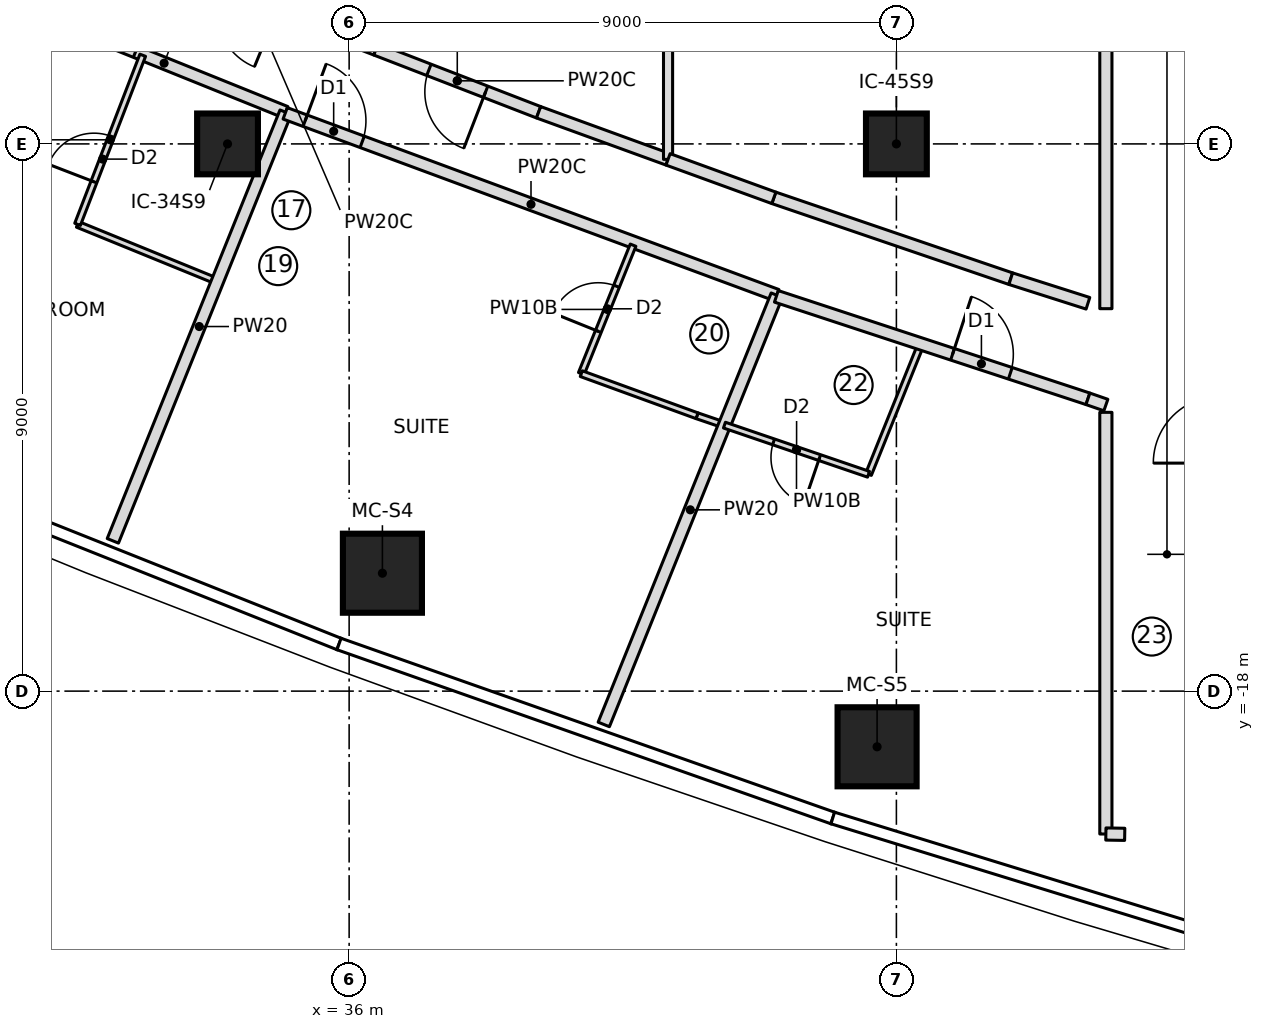
"""IFC4 building model, lengths in metres.
Left out: names, types, materials, properties, quantities, classifications, styles, units other than length and angle.
Written with IfcOpenShell. Run it as: python <this file> out.ifc"""

import sys

from ifc_helpers import new_model, si_unit, direction, frame, frame_2d, origin, origin_2d, place, context, subcontext, project, spatial, rectangle, extrude, element, fill, save


model = new_model("IFC4")
c1 = context("Model", 3, precision=1e-05, world=origin(), true_north=direction((0.0, 1.0)))
c2 = subcontext(c1, "Body", "Model", "MODEL_VIEW")
j1 = project(units=[si_unit("LENGTHUNIT", "METRE"), si_unit("PLANEANGLEUNIT", "RADIAN")], contexts=[c1])
p1 = place(None, origin())
s1 = spatial("IfcSite", under=j1, at=p1, CompositionType="ELEMENT")
p2 = place(p1, origin())
s2 = spatial("IfcBuilding", under=s1, at=p2, CompositionType="ELEMENT")
p3 = place(p2, frame((0.0, 0.0, 203.9)))
s3 = spatial("IfcBuildingStorey", under=s2, at=p3, CompositionType="ELEMENT", Elevation=203.9)
for number, where, z_axis, x_axis in (
    (1, (36.547, -16.061, 0.0), (0.0, 0.0, 1.0), (1.0, 0.0, 0.0)),
    (2, (44.683, -18.916, 0.0), (0.0, 0.0, 1.0), (1.0, 0.0, 0.0)),
):
    element("IfcColumn", number, at=place(p3, frame(where, z_axis=z_axis, x_axis=x_axis)), inside=s3, PredefinedType="COLUMN", context=c2, shape_type="SweptSolid", body=[
        extrude(rectangle(XDim=1.3, YDim=1.3, at=origin_2d()), origin(), (0.0, 0.0, 1.0), 3.55),
    ])
for number, where, z_axis, x_axis in (
    (3, (34.0, -9.0, 0.0), (0.0, 0.0, 1.0), (1.0, 0.0, 0.0)),
    (4, (45.0, -9.0, 0.0), (0.0, 0.0, 1.0), (1.0, 0.0, 0.0)),
):
    element("IfcColumn", number, at=place(p3, frame(where, z_axis=z_axis, x_axis=x_axis)), inside=s3, PredefinedType="COLUMN", context=c2, shape_type="SweptSolid", body=[
        extrude(rectangle(XDim=1.0, YDim=1.0, at=origin_2d()), origin(), (0.0, 0.0, 1.0), 3.55),
    ])
p4 = place(p3, frame((30.958, -6.866, 0.0), z_axis=(0.0, 0.0, 1.0), x_axis=(0.927398695046, -0.374074404933, 0.0)))
e5 = element("IfcWall", 5, at=p4, inside=s3, PredefinedType="PARTITIONING", context=c2, shape_type="SweptSolid", body=[
    extrude(rectangle(XDim=4.311, YDim=0.2, at=frame_2d((2.155, 0.0))), origin(), (0.0, 0.0, 1.0), 3.25),
])
p5 = place(p4, frame((0.65, 0.0, 0.0)))
e6 = element("IfcOpeningElement", 6, at=p5, cuts=e5, PredefinedType="OPENING", context=c2, shape_type="SweptSolid", body=[
    extrude(rectangle(XDim=1.0, YDim=2.1, at=frame_2d((0.5, 1.05))), frame((0.0, 0.11, 0.0), z_axis=(0.0, -1.0, 0.0), x_axis=(1.0, 0.0, 0.0)), (0.0, 0.0, 1.0), 0.22),
])
p6 = place(p3, frame((33.834, -11.261, 0.0), z_axis=(0.0, 0.0, 1.0), x_axis=(-0.925906573805, 0.377752586469, 0.0)))
e7 = element("IfcWall", 7, at=p6, inside=s3, PredefinedType="PARTITIONING", context=c2, shape_type="SweptSolid", body=[
    extrude(rectangle(XDim=2.484, YDim=0.1, at=frame_2d((1.242, 0.0))), origin(), (0.0, 0.0, 1.0), 3.25),
])
p7 = place(p3, frame((31.534, -10.323, 0.0), z_axis=(0.0, 0.0, 1.0), x_axis=(0.359610255373, 0.933102601127, 0.0)))
e8 = element("IfcWall", 8, at=p7, inside=s3, PredefinedType="PARTITIONING", context=c2, shape_type="SweptSolid", body=[
    extrude(rectangle(XDim=2.98, YDim=0.1, at=frame_2d((1.49, 0.0))), origin(), (0.0, 0.0, 1.0), 3.25),
])
p8 = place(p7, frame((0.75, 0.0, 0.0)))
e9 = element("IfcOpeningElement", 9, at=p8, cuts=e8, PredefinedType="OPENING", context=c2, shape_type="SweptSolid", body=[
    extrude(rectangle(XDim=0.8, YDim=2.1, at=frame_2d((0.4, 1.05))), frame((0.0, 0.06, 0.0), z_axis=(0.0, -1.0, 0.0), x_axis=(1.0, 0.0, 0.0)), (0.0, 0.0, 1.0), 0.12),
])
p9 = place(p3, frame((32.114, -15.528, 0.0), z_axis=(0.0, 0.0, 1.0), x_axis=(0.373881438439, 0.927476506436, 0.0)))
e10 = element("IfcWall", 10, at=p9, inside=s3, PredefinedType="PARTITIONING", context=c2, shape_type="SweptSolid", body=[
    extrude(rectangle(XDim=7.601, YDim=0.2, at=frame_2d((3.8, 0.0))), origin(), (0.0, 0.0, 1.0), 3.25),
])
p10 = place(p3, frame((34.948, -8.497, 0.0), z_axis=(0.0, 0.0, 1.0), x_axis=(0.937864515454, -0.347001657996, 0.0)))
e11 = element("IfcWall", 11, at=p10, inside=s3, PredefinedType="PARTITIONING", context=c2, shape_type="SweptSolid", body=[
    extrude(rectangle(XDim=8.621, YDim=0.2, at=frame_2d((4.311, 0.0))), origin(), (0.0, 0.0, 1.0), 3.25),
])
p11 = place(p10, frame((0.35, 0.0, 0.0)))
e12 = element("IfcOpeningElement", 12, at=p11, cuts=e11, PredefinedType="OPENING", context=c2, shape_type="SweptSolid", body=[
    extrude(rectangle(XDim=1.0, YDim=2.1, at=frame_2d((0.5, 1.05))), frame((0.0, 0.11, 0.0), z_axis=(0.0, -1.0, 0.0), x_axis=(1.0, 0.0, 0.0)), (0.0, 0.0, 1.0), 0.22),
])
p12 = place(p3, frame((39.818, -12.779, 0.0), z_axis=(0.0, 0.0, 1.0), x_axis=(0.373883593317, 0.927475637765, 0.0)))
e13 = element("IfcWall", 13, at=p12, inside=s3, PredefinedType="PARTITIONING", context=c2, shape_type="SweptSolid", body=[
    extrude(rectangle(XDim=2.278, YDim=0.1, at=frame_2d((1.139, 0.0))), origin(), (0.0, 0.0, 1.0), 3.25),
])
p13 = place(p12, frame((0.75, 0.0, 0.0)))
e14 = element("IfcOpeningElement", 14, at=p13, cuts=e13, PredefinedType="OPENING", context=c2, shape_type="SweptSolid", body=[
    extrude(rectangle(XDim=0.8, YDim=2.1, at=frame_2d((0.4, 1.05))), frame((0.0, 0.06, 0.0), z_axis=(0.0, -1.0, 0.0), x_axis=(1.0, 0.0, 0.0)), (0.0, 0.0, 1.0), 0.12),
])
p14 = place(p3, frame((42.172, -13.625, 0.0), z_axis=(0.0, 0.0, 1.0), x_axis=(-0.946456821894, 0.322830426526, 0.0)))
e15 = element("IfcWall", 15, at=p14, inside=s3, PredefinedType="PARTITIONING", context=c2, shape_type="SweptSolid", body=[
    extrude(rectangle(XDim=0.476, YDim=0.1, at=frame_2d((0.238, 0.0))), origin(), (0.0, 0.0, 1.0), 3.25),
])
p15 = place(p3, frame((41.721, -13.471, 0.0), z_axis=(0.0, 0.0, 1.0), x_axis=(-0.939737092411, 0.341897933814, 0.0)))
e16 = element("IfcWall", 16, at=p15, inside=s3, PredefinedType="PARTITIONING", context=c2, shape_type="SweptSolid", body=[
    extrude(rectangle(XDim=2.025, YDim=0.1, at=frame_2d((1.013, 0.0))), origin(), (0.0, 0.0, 1.0), 3.25),
])
p16 = place(p3, frame((40.188, -18.548, 0.0), z_axis=(0.0, 0.0, 1.0), x_axis=(0.373877998371, 0.927477893178, 0.0)))
e17 = element("IfcWall", 17, at=p16, inside=s3, PredefinedType="PARTITIONING", context=c2, shape_type="SweptSolid", body=[
    extrude(rectangle(XDim=7.611, YDim=0.2, at=frame_2d((3.806, 0.0))), origin(), (0.0, 0.0, 1.0), 3.25),
])
p17 = place(p3, frame((45.395, -12.318, 0.0), z_axis=(0.0, 0.0, 1.0), x_axis=(-0.373917841166, -0.927461831052, 0.0)))
e18 = element("IfcWall", 18, at=p17, inside=s3, PredefinedType="PARTITIONING", context=c2, shape_type="SweptSolid", body=[
    extrude(rectangle(XDim=2.281, YDim=0.1, at=frame_2d((1.14, 0.0))), origin(), (0.0, 0.0, 1.0), 3.25),
])
p18 = place(p3, frame((44.542, -14.434, 0.0), z_axis=(0.0, 0.0, 1.0), x_axis=(-0.946406575113, 0.322977699822, 0.0)))
e19 = element("IfcWall", 19, at=p18, inside=s3, PredefinedType="PARTITIONING", context=c2, shape_type="SweptSolid", body=[
    extrude(rectangle(XDim=2.504, YDim=0.1, at=frame_2d((1.252, 0.0))), origin(), (0.0, 0.0, 1.0), 3.25),
])
p19 = place(p18, frame((0.85, 0.0, 0.0)))
e20 = element("IfcOpeningElement", 20, at=p19, cuts=e19, PredefinedType="OPENING", context=c2, shape_type="SweptSolid", body=[
    extrude(rectangle(XDim=0.8, YDim=2.1, at=frame_2d((0.4, 1.05))), frame((0.0, 0.06, 0.0), z_axis=(0.0, -1.0, 0.0), x_axis=(1.0, 0.0, 0.0)), (0.0, 0.0, 1.0), 0.12),
])
p20 = place(p3, frame((36.441, -7.445, 0.0), z_axis=(0.0, 0.0, 1.0), x_axis=(-0.932724985261, 0.360588549276, 0.0)))
e21 = element("IfcWall", 21, at=p20, inside=s3, PredefinedType="PARTITIONING", context=c2, shape_type="SweptSolid", body=[
    extrude(rectangle(XDim=1.25, YDim=0.2, at=frame_2d((0.625, 0.0))), origin(), (0.0, 0.0, 1.0), 3.25),
])
p21 = place(p3, frame((39.115, -8.479, 0.0), z_axis=(0.0, 0.0, 1.0), x_axis=(-0.932650373077, 0.36078148733, 0.0)))
e22 = element("IfcWall", 22, at=p21, inside=s3, PredefinedType="PARTITIONING", context=c2, shape_type="SweptSolid", body=[
    extrude(rectangle(XDim=2.867, YDim=0.2, at=frame_2d((1.434, 0.0))), origin(), (0.0, 0.0, 1.0), 3.25),
])
p22 = place(p21, frame((0.934, 0.0, 0.0)))
e23 = element("IfcOpeningElement", 23, at=p22, cuts=e22, PredefinedType="OPENING", context=c2, shape_type="SweptSolid", body=[
    extrude(rectangle(XDim=1.0, YDim=2.1, at=frame_2d((0.5, 1.05))), frame((0.0, 0.11, 0.0), z_axis=(0.0, -1.0, 0.0), x_axis=(1.0, 0.0, 0.0)), (0.0, 0.0, 1.0), 0.22),
])
p23 = place(p3, frame((41.245, -9.254, 0.0), z_axis=(0.0, 0.0, 1.0), x_axis=(-0.939746227223, 0.341872824923, 0.0)))
e24 = element("IfcWall", 24, at=p23, inside=s3, PredefinedType="PARTITIONING", context=c2, shape_type="SweptSolid", body=[
    extrude(rectangle(XDim=2.266, YDim=0.2, at=frame_2d((1.133, 0.0))), origin(), (0.0, 0.0, 1.0), 3.25),
])
p24 = place(p3, frame((41.245, -9.254, 0.0), z_axis=(0.0, 0.0, 1.0), x_axis=(0.0, 1.0, 0.0)))
e25 = element("IfcWall", 25, at=p24, inside=s3, PredefinedType="PARTITIONING", context=c2, shape_type="SweptSolid", body=[
    extrude(rectangle(XDim=18.508, YDim=0.15, at=frame_2d((9.254, 0.0))), origin(), (0.0, 0.0, 1.0), 3.25),
])
p25 = place(p3, frame((46.881, -11.217, 0.0), z_axis=(0.0, 0.0, 1.0), x_axis=(-0.946436071896, 0.322891253852, 0.0)))
e26 = element("IfcWall", 26, at=p25, inside=s3, PredefinedType="PARTITIONING", context=c2, shape_type="SweptSolid", body=[
    extrude(rectangle(XDim=4.117, YDim=0.2, at=frame_2d((2.059, 0.0))), origin(), (0.0, 0.0, 1.0), 3.25),
])
p26 = place(p3, frame((42.984, -9.887, 0.0), z_axis=(0.0, 0.0, 1.0), x_axis=(-0.939704824537, 0.341986611933, 0.0)))
e27 = element("IfcWall", 27, at=p26, inside=s3, PredefinedType="PARTITIONING", context=c2, shape_type="SweptSolid", body=[
    extrude(rectangle(XDim=1.851, YDim=0.2, at=frame_2d((0.926, 0.0))), origin(), (0.0, 0.0, 1.0), 3.25),
])
p27 = place(p3, frame((43.026, -11.507, 0.0), z_axis=(0.0, 0.0, 1.0), x_axis=(0.949951949432, -0.312396052744, 0.0)))
e28 = element("IfcWall", 28, at=p27, inside=s3, PredefinedType="PARTITIONING", context=c2, shape_type="SweptSolid", body=[
    extrude(rectangle(XDim=5.394, YDim=0.2, at=frame_2d((2.697, 0.0))), origin(), (0.0, 0.0, 1.0), 3.25),
])
p28 = place(p27, frame((3.05, 0.0, 0.0)))
e29 = element("IfcOpeningElement", 29, at=p28, cuts=e28, PredefinedType="OPENING", context=c2, shape_type="SweptSolid", body=[
    extrude(rectangle(XDim=1.0, YDim=2.1, at=frame_2d((0.5, 1.05))), frame((0.0, 0.11, 0.0), z_axis=(0.0, -1.0, 0.0), x_axis=(1.0, 0.0, 0.0)), (0.0, 0.0, 1.0), 0.22),
])
p29 = place(p3, frame((48.15, -11.621, 0.0), z_axis=(0.0, 0.0, 1.0), x_axis=(-0.952761948983, 0.303718074157, 0.0)))
e30 = element("IfcWall", 30, at=p29, inside=s3, PredefinedType="PARTITIONING", context=c2, shape_type="SweptSolid", body=[
    extrude(rectangle(XDim=1.332, YDim=0.2, at=frame_2d((0.666, 0.0))), origin(), (0.0, 0.0, 1.0), 3.25),
])
p30 = place(p3, frame((48.445, 11.71, 0.0), z_axis=(0.0, 0.0, 1.0), x_axis=(0.0, -1.0, 0.0)))
e31 = element("IfcWall", 31, at=p30, inside=s3, PredefinedType="PARTITIONING", context=c2, shape_type="SweptSolid", body=[
    extrude(rectangle(XDim=23.42, YDim=0.2, at=frame_2d((11.71, 0.0))), origin(), (0.0, 0.0, 1.0), 3.25),
])
p31 = place(p3, frame((48.15, -13.192, 0.0), z_axis=(0.0, 0.0, 1.0), x_axis=(0.944623214561, -0.328156947987, 0.0)))
e32 = element("IfcWall", 32, at=p31, inside=s3, PredefinedType="PARTITIONING", context=c2, shape_type="SweptSolid", body=[
    extrude(rectangle(XDim=0.312, YDim=0.2, at=frame_2d((0.156, 0.0))), origin(), (0.0, 0.0, 1.0), 3.25),
])
p32 = place(p3, frame((48.445, -13.415, 0.0), z_axis=(0.0, 0.0, 1.0), x_axis=(0.0, -1.0, 0.0)))
e33 = element("IfcWall", 33, at=p32, inside=s3, PredefinedType="PARTITIONING", context=c2, shape_type="SweptSolid", body=[
    extrude(rectangle(XDim=6.935, YDim=0.2, at=frame_2d((3.468, 0.0))), origin(), (0.0, 0.0, 1.0), 3.25),
])
p33 = place(p3, frame((48.445, -20.35, 0.0), z_axis=(0.0, 0.0, 1.0), x_axis=(0.999849757003, -0.017333880736, 0.0)))
e34 = element("IfcWall", 34, at=p33, inside=s3, PredefinedType="PARTITIONING", context=c2, shape_type="SweptSolid", body=[
    extrude(rectangle(XDim=0.31, YDim=0.2, at=frame_2d((0.155, 0.0))), origin(), (0.0, 0.0, 1.0), 3.25),
])
p34 = place(p8, origin())
e35 = element("IfcDoor", 35, at=p34, inside=s3, OperationType="SINGLE_SWING_LEFT", PredefinedType="DOOR", context=c2, shape_type="SweptSolid", body=[
    extrude(rectangle(XDim=0.8, YDim=2.1, at=frame_2d((0.4, 1.05))), frame((0.0, 0.025, 0.0), z_axis=(0.0, -1.0, 0.0), x_axis=(1.0, 0.0, 0.0)), (0.0, 0.0, 1.0), 0.05),
])
fill(e9, e35)
p35 = place(p5, origin())
e36 = element("IfcDoor", 36, at=p35, inside=s3, OperationType="SINGLE_SWING_LEFT", PredefinedType="DOOR", context=c2, shape_type="SweptSolid", body=[
    extrude(rectangle(XDim=1.0, YDim=2.1, at=frame_2d((0.5, 1.05))), frame((0.0, 0.025, 0.0), z_axis=(0.0, -1.0, 0.0), x_axis=(1.0, 0.0, 0.0)), (0.0, 0.0, 1.0), 0.05),
])
fill(e6, e36)
p36 = place(p13, origin())
e37 = element("IfcDoor", 37, at=p36, inside=s3, OperationType="SINGLE_SWING_LEFT", PredefinedType="DOOR", context=c2, shape_type="SweptSolid", body=[
    extrude(rectangle(XDim=0.8, YDim=2.1, at=frame_2d((0.4, 1.05))), frame((0.0, 0.025, 0.0), z_axis=(0.0, -1.0, 0.0), x_axis=(1.0, 0.0, 0.0)), (0.0, 0.0, 1.0), 0.05),
])
fill(e14, e37)
p37 = place(p11, origin())
e38 = element("IfcDoor", 38, at=p37, inside=s3, OperationType="SINGLE_SWING_LEFT", PredefinedType="DOOR", context=c2, shape_type="SweptSolid", body=[
    extrude(rectangle(XDim=1.0, YDim=2.1, at=frame_2d((0.5, 1.05))), frame((0.0, 0.025, 0.0), z_axis=(0.0, -1.0, 0.0), x_axis=(1.0, 0.0, 0.0)), (0.0, 0.0, 1.0), 0.05),
])
fill(e12, e38)
p38 = place(p19, origin())
e39 = element("IfcDoor", 39, at=p38, inside=s3, OperationType="SINGLE_SWING_LEFT", PredefinedType="DOOR", context=c2, shape_type="SweptSolid", body=[
    extrude(rectangle(XDim=0.8, YDim=2.1, at=frame_2d((0.4, 1.05))), frame((0.0, 0.025, 0.0), z_axis=(0.0, -1.0, 0.0), x_axis=(1.0, 0.0, 0.0)), (0.0, 0.0, 1.0), 0.05),
])
fill(e20, e39)
p39 = place(p28, origin())
e40 = element("IfcDoor", 40, at=p39, inside=s3, OperationType="SINGLE_SWING_LEFT", PredefinedType="DOOR", context=c2, shape_type="SweptSolid", body=[
    extrude(rectangle(XDim=1.0, YDim=2.1, at=frame_2d((0.5, 1.05))), frame((0.0, 0.025, 0.0), z_axis=(0.0, -1.0, 0.0), x_axis=(1.0, 0.0, 0.0)), (0.0, 0.0, 1.0), 0.05),
])
fill(e29, e40)
p40 = place(p22, origin())
e41 = element("IfcDoor", 41, at=p40, inside=s3, OperationType="SINGLE_SWING_RIGHT", PredefinedType="DOOR", context=c2, shape_type="SweptSolid", body=[
    extrude(rectangle(XDim=1.0, YDim=2.1, at=frame_2d((0.5, 1.05))), frame((0.0, 0.025, 0.0), z_axis=(0.0, -1.0, 0.0), x_axis=(1.0, 0.0, 0.0)), (0.0, 0.0, 1.0), 0.05),
])
fill(e23, e41)
save(model, sys.argv[1])
